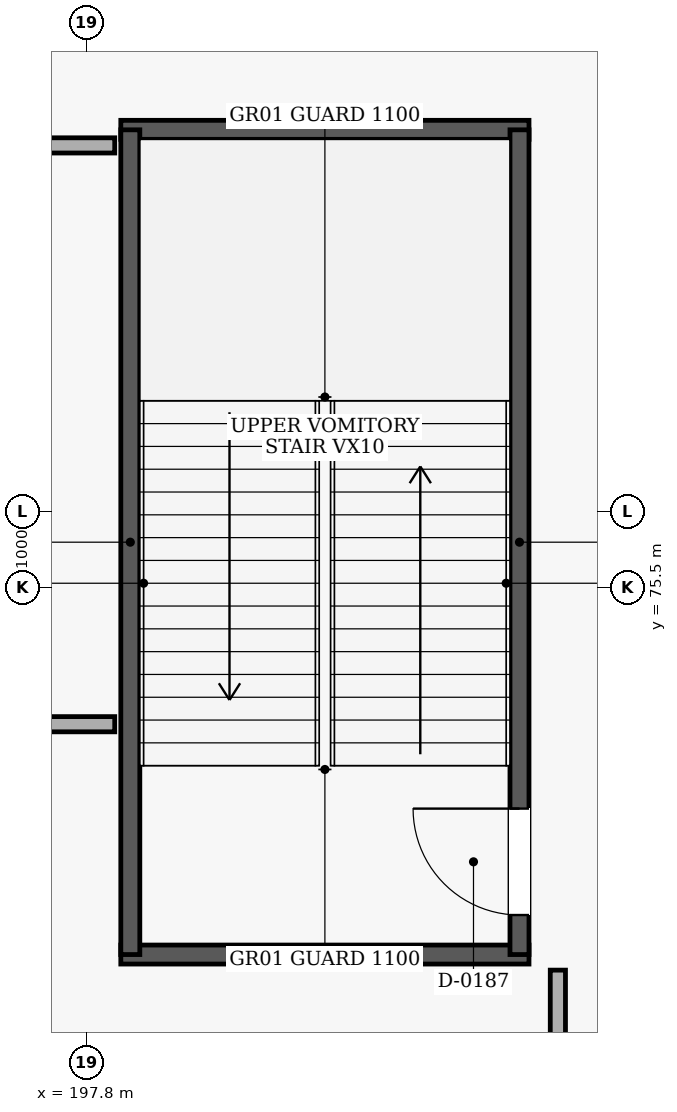
"""IFC4 building model, lengths in metres.
Left out: names, types, materials, properties, quantities, classifications, styles, units other than length and angle.
Written with IfcOpenShell. Run it as: python <this file> out.ifc"""

import sys

from ifc_helpers import new_model, si_unit, direction, frame, frame_2d, origin, place, context, subcontext, project, spatial, rectangle, extrude, element, fill, save


model = new_model("IFC4")
c1 = context("Model", 3, precision=1e-05, world=origin(), true_north=direction((0.0, 1.0)))
c2 = subcontext(c1, "Body", "Model", "MODEL_VIEW")
j1 = project(units=[si_unit("LENGTHUNIT", "METRE"), si_unit("PLANEANGLEUNIT", "RADIAN")], contexts=[c1])
p1 = place(None, origin())
s1 = spatial("IfcSite", under=j1, at=p1, CompositionType="ELEMENT")
p2 = place(p1, origin())
s2 = spatial("IfcBuilding", under=s1, at=p2, CompositionType="ELEMENT")
p3 = place(p2, origin())
s3 = spatial("IfcBuildingStorey", under=s2, at=p3, CompositionType="ELEMENT", Elevation=0.0)
for number, where, z_axis, x_axis in (
    (1, (198.25, 70.675, 0.0), (0.0, 0.0, 1.0), (1.0, 0.0, 0.0)),
    (2, (203.62, 81.525, 0.0), (0.0, 0.0, 1.0), (-1.0, 0.0, 0.0)),
):
    element("IfcWall", number, at=place(p3, frame(where, z_axis=z_axis, x_axis=x_axis)), inside=s3, PredefinedType="SHEAR", context=c2, shape_type="SweptSolid", body=[
        extrude(rectangle(XDim=5.37, YDim=0.25, at=frame_2d((2.685, 0.0))), origin(), (0.0, 0.0, 1.0), 5.08),
    ])
p4 = place(p3, frame((198.375, 70.675, 0.0), z_axis=(0.0, 0.0, 1.0), x_axis=(0.0, 1.0, 0.0)))
e3 = element("IfcWall", 3, at=p4, inside=s3, PredefinedType="SHEAR", context=c2, shape_type="SweptSolid", body=[
    extrude(rectangle(XDim=10.85, YDim=0.25, at=frame_2d((5.425, 0.0))), origin(), (0.0, 0.0, 1.0), 5.08),
])
p5 = place(p3, frame((203.495, 70.675, 0.0), z_axis=(0.0, 0.0, 1.0), x_axis=(0.0, 1.0, 0.0)))
e4 = element("IfcWall", 4, at=p5, inside=s3, PredefinedType="SHEAR", context=c2, shape_type="SweptSolid", body=[
    extrude(rectangle(XDim=10.85, YDim=0.25, at=frame_2d((5.425, 0.0))), origin(), (0.0, 0.0, 1.0), 5.08),
])
p6 = place(p5, frame((0.52, 0.0, 0.0)))
e5 = element("IfcOpeningElement", 5, at=p6, cuts=e4, PredefinedType="OPENING", context=c2, shape_type="SweptSolid", body=[
    extrude(rectangle(XDim=1.4, YDim=2.15, at=frame_2d((0.7, 1.075))), frame((0.0, 0.135, 0.0), z_axis=(0.0, -1.0, 0.0), x_axis=(1.0, 0.0, 0.0)), (0.0, 0.0, 1.0), 0.27),
])
p7 = place(p3, frame((204.0, 67.33, 0.0), z_axis=(0.0, 0.0, 1.0), x_axis=(0.0, 1.0, 0.0)))
e6 = element("IfcWall", 6, at=p7, inside=s3, PredefinedType="PARTITIONING", context=c2, shape_type="SweptSolid", body=[
    extrude(rectangle(XDim=3.14, YDim=0.2, at=frame_2d((1.57, 0.0))), origin(), (0.0, 0.0, 1.0), 5.08),
])
p8 = place(p7, frame((1.09, 0.0, 0.0)))
e7 = element("IfcOpeningElement", 7, at=p8, cuts=e6, PredefinedType="OPENING", context=c2, shape_type="SweptSolid", body=[
    extrude(rectangle(XDim=0.96, YDim=2.1, at=frame_2d((0.48, 1.05))), frame((0.0, 0.11, 0.0), z_axis=(0.0, -1.0, 0.0), x_axis=(1.0, 0.0, 0.0)), (0.0, 0.0, 1.0), 0.22),
])
p9 = place(p3, frame((175.6, 73.705, 0.0), z_axis=(0.0, 0.0, 1.0), x_axis=(1.0, 0.0, 0.0)))
e8 = element("IfcWall", 8, at=p9, inside=s3, PredefinedType="PARTITIONING", context=c2, shape_type="SweptSolid", body=[
    extrude(rectangle(XDim=22.57, YDim=0.2, at=frame_2d((11.285, 0.0))), origin(), (0.0, 0.0, 1.0), 5.08),
])
p10 = place(p3, frame((198.17, 81.32, 0.0), z_axis=(0.0, 0.0, 1.0), x_axis=(-1.0, 0.0, 0.0)))
e9 = element("IfcWall", 9, at=p10, inside=s3, PredefinedType="PARTITIONING", context=c2, shape_type="SweptSolid", body=[
    extrude(rectangle(XDim=22.57, YDim=0.2, at=frame_2d((11.285, 0.0))), origin(), (0.0, 0.0, 1.0), 5.08),
])
p11 = place(p10, frame((10.785, 0.0, 0.0)))
e10 = element("IfcOpeningElement", 10, at=p11, cuts=e9, PredefinedType="OPENING", context=c2, shape_type="SweptSolid", body=[
    extrude(rectangle(XDim=1.0, YDim=2.1, at=frame_2d((0.5, 1.05))), frame((0.0, 0.11, 0.0), z_axis=(0.0, -1.0, 0.0), x_axis=(1.0, 0.0, 0.0)), (0.0, 0.0, 1.0), 0.22),
])
p12 = place(p6, frame((1.4, 0.0, 0.0), z_axis=(0.0, 0.0, 1.0), x_axis=(-1.0, 0.0, 0.0)))
e11 = element("IfcDoor", 11, at=p12, inside=s3, OperationType="SINGLE_SWING_LEFT", PredefinedType="DOOR", context=c2, shape_type="SweptSolid", body=[
    extrude(rectangle(XDim=1.4, YDim=2.15, at=frame_2d((0.7, 1.075))), frame((0.0, 0.025, 0.0), z_axis=(0.0, -1.0, 0.0), x_axis=(1.0, 0.0, 0.0)), (0.0, 0.0, 1.0), 0.05),
])
fill(e5, e11)
save(model, sys.argv[1])
